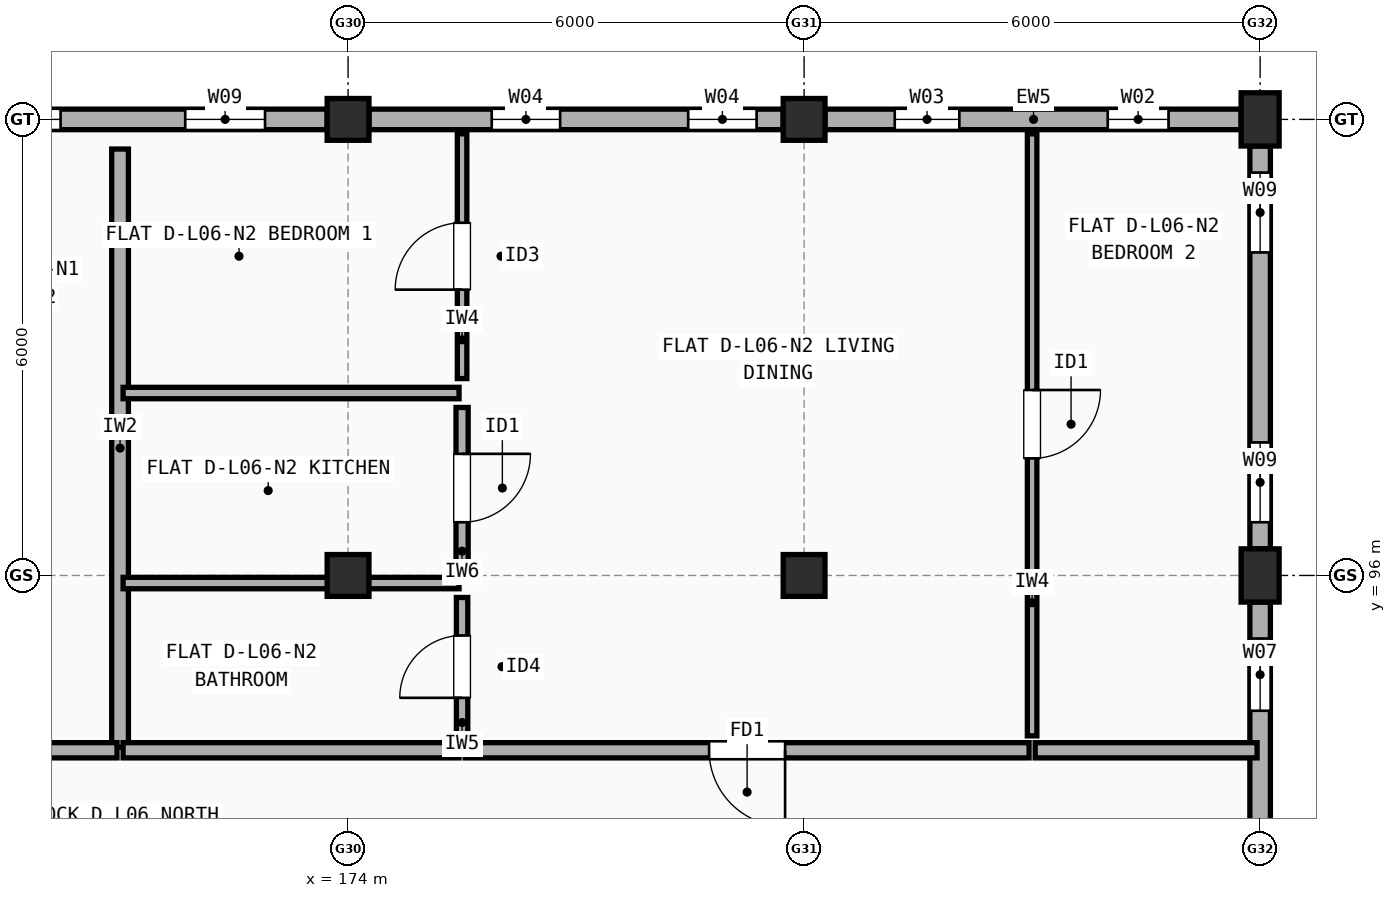
"""IFC4 building model, lengths in metres.
Left out: names, types, materials, properties, quantities, classifications, styles, units other than length and angle.
Written with IfcOpenShell. Run it as: python <this file> out.ifc"""

import sys

from ifc_helpers import new_model, si_unit, direction, frame, frame_2d, origin, origin_2d, place, context, subcontext, project, spatial, rectangle, extrude, element, fill, save


model = new_model("IFC4")
c1 = context("Model", 3, precision=1e-05, world=origin(), true_north=direction((0.0, 1.0)))
c2 = subcontext(c1, "Body", "Model", "MODEL_VIEW")
j1 = project(units=[si_unit("LENGTHUNIT", "METRE"), si_unit("PLANEANGLEUNIT", "RADIAN")], contexts=[c1])
p1 = place(None, origin())
s1 = spatial("IfcSite", under=j1, at=p1, CompositionType="ELEMENT")
p2 = place(p1, origin())
s2 = spatial("IfcBuilding", under=s1, at=p2, CompositionType="ELEMENT")
p3 = place(p2, frame((0.0, 0.0, 20.5)))
s3 = spatial("IfcBuildingStorey", under=s2, at=p3, CompositionType="ELEMENT", Elevation=20.5)
for number, where, z_axis, x_axis in (
    (1, (174.0, 96.0, 0.0), (0.0, 0.0, 1.0), (1.0, 0.0, 0.0)),
    (2, (174.0, 102.0, 0.0), (0.0, 0.0, 1.0), (1.0, 0.0, 0.0)),
    (3, (180.0, 96.0, 0.0), (0.0, 0.0, 1.0), (1.0, 0.0, 0.0)),
    (4, (180.0, 102.0, 0.0), (0.0, 0.0, 1.0), (1.0, 0.0, 0.0)),
):
    element("IfcColumn", number, at=place(p3, frame(where, z_axis=z_axis, x_axis=x_axis)), inside=s3, PredefinedType="COLUMN", context=c2, shape_type="SweptSolid", body=[
        extrude(rectangle(XDim=0.55, YDim=0.55, at=origin_2d()), origin(), (0.0, 0.0, 1.0), 2.97),
    ])
for number, where, z_axis, x_axis in (
    (5, (186.0, 96.0, 0.0), (0.0, 0.0, 1.0), (1.0, 0.0, 0.0)),
    (6, (186.0, 102.0, 0.0), (0.0, 0.0, 1.0), (1.0, 0.0, 0.0)),
):
    element("IfcColumn", number, at=place(p3, frame(where, z_axis=z_axis, x_axis=x_axis)), inside=s3, PredefinedType="COLUMN", context=c2, shape_type="SweptSolid", body=[
        extrude(rectangle(XDim=0.5, YDim=0.7, at=origin_2d()), origin(), (0.0, 0.0, 1.0), 2.97),
    ])
p4 = place(p3, frame((186.0, 90.35, 0.0), z_axis=(0.0, 0.0, 1.0), x_axis=(0.0, 1.0, 0.0)))
e7 = element("IfcWall", 7, at=p4, inside=s3, PredefinedType="STANDARD", context=c2, shape_type="SweptSolid", body=[
    extrude(rectangle(XDim=5.3, YDim=0.27, at=frame_2d((2.65, 0.0))), origin(), (0.0, 0.0, 1.0), 2.452),
])
p5 = place(p4, frame((1.205, 0.0, 0.9)))
e8 = element("IfcOpeningElement", 8, at=p5, cuts=e7, PredefinedType="OPENING", context=c2, shape_type="SweptSolid", body=[
    extrude(rectangle(XDim=0.9, YDim=1.3, at=frame_2d((0.45, 0.65))), frame((0.0, 0.145, 0.0), z_axis=(0.0, -1.0, 0.0), x_axis=(1.0, 0.0, 0.0)), (0.0, 0.0, 1.0), 0.29),
])
p6 = place(p4, frame((3.87, 0.0, 0.9)))
e9 = element("IfcOpeningElement", 9, at=p6, cuts=e7, PredefinedType="OPENING", context=c2, shape_type="SweptSolid", body=[
    extrude(rectangle(XDim=0.95, YDim=1.35, at=frame_2d((0.475, 0.675))), frame((0.0, 0.145, 0.0), z_axis=(0.0, -1.0, 0.0), x_axis=(1.0, 0.0, 0.0)), (0.0, 0.0, 1.0), 0.29),
])
p7 = place(p3, frame((186.0, 96.35, 0.0), z_axis=(0.0, 0.0, 1.0), x_axis=(0.0, 1.0, 0.0)))
e10 = element("IfcWall", 10, at=p7, inside=s3, PredefinedType="STANDARD", context=c2, shape_type="SweptSolid", body=[
    extrude(rectangle(XDim=5.3, YDim=0.27, at=frame_2d((2.65, 0.0))), origin(), (0.0, 0.0, 1.0), 2.452),
])
p8 = place(p7, frame((0.35, 0.0, 0.9)))
e11 = element("IfcOpeningElement", 11, at=p8, cuts=e10, PredefinedType="OPENING", context=c2, shape_type="SweptSolid", body=[
    extrude(rectangle(XDim=1.05, YDim=1.35, at=frame_2d((0.525, 0.675))), frame((0.0, 0.145, 0.0), z_axis=(0.0, -1.0, 0.0), x_axis=(1.0, 0.0, 0.0)), (0.0, 0.0, 1.0), 0.29),
])
p9 = place(p7, frame((3.9, 0.0, 0.9)))
e12 = element("IfcOpeningElement", 12, at=p9, cuts=e10, PredefinedType="OPENING", context=c2, shape_type="SweptSolid", body=[
    extrude(rectangle(XDim=1.05, YDim=1.35, at=frame_2d((0.525, 0.675))), frame((0.0, 0.145, 0.0), z_axis=(0.0, -1.0, 0.0), x_axis=(1.0, 0.0, 0.0)), (0.0, 0.0, 1.0), 0.29),
])
p10 = place(p3, frame((185.75, 102.0, 0.0), z_axis=(0.0, 0.0, 1.0), x_axis=(-1.0, 0.0, 0.0)))
e13 = element("IfcWall", 13, at=p10, inside=s3, PredefinedType="STANDARD", context=c2, shape_type="SweptSolid", body=[
    extrude(rectangle(XDim=5.475, YDim=0.27, at=frame_2d((2.738, 0.0))), origin(), (0.0, 0.0, 1.0), 2.452),
])
p11 = place(p10, frame((0.955, 0.0, 0.9)))
e14 = element("IfcOpeningElement", 14, at=p11, cuts=e13, PredefinedType="OPENING", context=c2, shape_type="SweptSolid", body=[
    extrude(rectangle(XDim=0.8, YDim=1.2, at=frame_2d((0.4, 0.6))), frame((0.0, 0.145, 0.0), z_axis=(0.0, -1.0, 0.0), x_axis=(1.0, 0.0, 0.0)), (0.0, 0.0, 1.0), 0.29),
])
p12 = place(p10, frame((3.708, 0.0, 0.9)))
e15 = element("IfcOpeningElement", 15, at=p12, cuts=e13, PredefinedType="OPENING", context=c2, shape_type="SweptSolid", body=[
    extrude(rectangle(XDim=0.85, YDim=1.25, at=frame_2d((0.425, 0.625))), frame((0.0, 0.145, 0.0), z_axis=(0.0, -1.0, 0.0), x_axis=(1.0, 0.0, 0.0)), (0.0, 0.0, 1.0), 0.29),
])
p13 = place(p3, frame((179.725, 102.0, 0.0), z_axis=(0.0, 0.0, 1.0), x_axis=(-1.0, 0.0, 0.0)))
e16 = element("IfcWall", 16, at=p13, inside=s3, PredefinedType="STANDARD", context=c2, shape_type="SweptSolid", body=[
    extrude(rectangle(XDim=5.45, YDim=0.27, at=frame_2d((2.725, 0.0))), origin(), (0.0, 0.0, 1.0), 2.452),
])
p14 = place(p13, frame((0.35, 0.0, 0.9)))
e17 = element("IfcOpeningElement", 17, at=p14, cuts=e16, PredefinedType="OPENING", context=c2, shape_type="SweptSolid", body=[
    extrude(rectangle(XDim=0.9, YDim=1.3, at=frame_2d((0.45, 0.65))), frame((0.0, 0.145, 0.0), z_axis=(0.0, -1.0, 0.0), x_axis=(1.0, 0.0, 0.0)), (0.0, 0.0, 1.0), 0.29),
])
p15 = place(p13, frame((2.935, 0.0, 0.9)))
e18 = element("IfcOpeningElement", 18, at=p15, cuts=e16, PredefinedType="OPENING", context=c2, shape_type="SweptSolid", body=[
    extrude(rectangle(XDim=0.9, YDim=1.3, at=frame_2d((0.45, 0.65))), frame((0.0, 0.145, 0.0), z_axis=(0.0, -1.0, 0.0), x_axis=(1.0, 0.0, 0.0)), (0.0, 0.0, 1.0), 0.29),
])
p16 = place(p3, frame((173.725, 102.0, 0.0), z_axis=(0.0, 0.0, 1.0), x_axis=(-1.0, 0.0, 0.0)))
e19 = element("IfcWall", 19, at=p16, inside=s3, PredefinedType="STANDARD", context=c2, shape_type="SweptSolid", body=[
    extrude(rectangle(XDim=5.45, YDim=0.27, at=frame_2d((2.725, 0.0))), origin(), (0.0, 0.0, 1.0), 2.452),
])
p17 = place(p16, frame((0.817, 0.0, 0.9)))
e20 = element("IfcOpeningElement", 20, at=p17, cuts=e19, PredefinedType="OPENING", context=c2, shape_type="SweptSolid", body=[
    extrude(rectangle(XDim=1.05, YDim=1.35, at=frame_2d((0.525, 0.675))), frame((0.0, 0.145, 0.0), z_axis=(0.0, -1.0, 0.0), x_axis=(1.0, 0.0, 0.0)), (0.0, 0.0, 1.0), 0.29),
])
p18 = place(p16, frame((3.508, 0.0, 0.9)))
e21 = element("IfcOpeningElement", 21, at=p18, cuts=e19, PredefinedType="OPENING", context=c2, shape_type="SweptSolid", body=[
    extrude(rectangle(XDim=1.2, YDim=1.35, at=frame_2d((0.6, 0.675))), frame((0.0, 0.145, 0.0), z_axis=(0.0, -1.0, 0.0), x_axis=(1.0, 0.0, 0.0)), (0.0, 0.0, 1.0), 0.29),
])
p19 = place(p3, frame((171.0, 93.74, 0.0), z_axis=(0.0, 0.0, 1.0), x_axis=(0.0, 1.0, 0.0)))
e22 = element("IfcWall", 22, at=p19, inside=s3, PredefinedType="SOLIDWALL", context=c2, shape_type="SweptSolid", body=[
    extrude(rectangle(XDim=7.87, YDim=0.22, at=frame_2d((3.935, 0.0))), origin(), (0.0, 0.0, 1.0), 2.508),
])
p20 = place(p3, frame((168.04, 93.7, 0.0), z_axis=(0.0, 0.0, 1.0), x_axis=(1.0, 0.0, 0.0)))
e23 = element("IfcWall", 23, at=p20, inside=s3, PredefinedType="SOLIDWALL", context=c2, shape_type="SweptSolid", body=[
    extrude(rectangle(XDim=2.92, YDim=0.2, at=frame_2d((1.46, 0.0))), origin(), (0.0, 0.0, 1.0), 2.508),
])
p21 = place(p3, frame((171.04, 93.7, 0.0), z_axis=(0.0, 0.0, 1.0), x_axis=(1.0, 0.0, 0.0)))
e24 = element("IfcWall", 24, at=p21, inside=s3, PredefinedType="SOLIDWALL", context=c2, shape_type="SweptSolid", body=[
    extrude(rectangle(XDim=4.42, YDim=0.2, at=frame_2d((2.21, 0.0))), origin(), (0.0, 0.0, 1.0), 2.97),
])
p22 = place(p3, frame((175.54, 93.7, 0.0), z_axis=(0.0, 0.0, 1.0), x_axis=(1.0, 0.0, 0.0)))
e25 = element("IfcWall", 25, at=p22, inside=s3, PredefinedType="SOLIDWALL", context=c2, shape_type="SweptSolid", body=[
    extrude(rectangle(XDim=7.42, YDim=0.2, at=frame_2d((3.71, 0.0))), origin(), (0.0, 0.0, 1.0), 2.97),
])
p23 = place(p22, frame((3.21, 0.0, 0.0)))
e26 = element("IfcOpeningElement", 26, at=p23, cuts=e25, PredefinedType="OPENING", context=c2, shape_type="SweptSolid", body=[
    extrude(rectangle(XDim=1.0, YDim=2.15, at=frame_2d((0.5, 1.075))), frame((0.0, 0.11, 0.0), z_axis=(0.0, -1.0, 0.0), x_axis=(1.0, 0.0, 0.0)), (0.0, 0.0, 1.0), 0.22),
])
p24 = place(p3, frame((175.5, 98.59, 0.0), z_axis=(0.0, 0.0, 1.0), x_axis=(0.0, 1.0, 0.0)))
e27 = element("IfcWall", 27, at=p24, inside=s3, PredefinedType="PARTITIONING", context=c2, shape_type="SweptSolid", body=[
    extrude(rectangle(XDim=3.22, YDim=0.125, at=frame_2d((1.61, 0.0))), origin(), (0.0, 0.0, 1.0), 2.97),
])
p25 = place(p24, frame((1.17, 0.0, 0.0)))
e28 = element("IfcOpeningElement", 28, at=p25, cuts=e27, PredefinedType="OPENING", context=c2, shape_type="SweptSolid", body=[
    extrude(rectangle(XDim=0.88, YDim=2.1, at=frame_2d((0.44, 1.05))), frame((0.0, 0.073, 0.0), z_axis=(0.0, -1.0, 0.0), x_axis=(1.0, 0.0, 0.0)), (0.0, 0.0, 1.0), 0.145),
])
p26 = place(p3, frame((175.5, 96.09, 0.0), z_axis=(0.0, 0.0, 1.0), x_axis=(0.0, 1.0, 0.0)))
e29 = element("IfcWall", 29, at=p26, inside=s3, PredefinedType="PLUMBINGWALL", context=c2, shape_type="SweptSolid", body=[
    extrude(rectangle(XDim=2.12, YDim=0.16, at=frame_2d((1.06, 0.0))), origin(), (0.0, 0.0, 1.0), 2.408),
])
p27 = place(p26, frame((0.61, 0.0, 0.0)))
e30 = element("IfcOpeningElement", 30, at=p27, cuts=e29, PredefinedType="OPENING", context=c2, shape_type="SweptSolid", body=[
    extrude(rectangle(XDim=0.9, YDim=2.1, at=frame_2d((0.45, 1.05))), frame((0.0, 0.09, 0.0), z_axis=(0.0, -1.0, 0.0), x_axis=(1.0, 0.0, 0.0)), (0.0, 0.0, 1.0), 0.18),
])
p28 = place(p3, frame((175.5, 93.89, 0.0), z_axis=(0.0, 0.0, 1.0), x_axis=(0.0, 1.0, 0.0)))
e31 = element("IfcWall", 31, at=p28, inside=s3, PredefinedType="PARTITIONING", context=c2, shape_type="SweptSolid", body=[
    extrude(rectangle(XDim=1.82, YDim=0.15, at=frame_2d((0.91, 0.0))), origin(), (0.0, 0.0, 1.0), 2.97),
])
p29 = place(p28, frame((0.5, 0.0, 0.0)))
e32 = element("IfcOpeningElement", 32, at=p29, cuts=e31, PredefinedType="OPENING", context=c2, shape_type="SweptSolid", body=[
    extrude(rectangle(XDim=0.82, YDim=2.08, at=frame_2d((0.41, 1.04))), frame((0.0, 0.085, 0.0), z_axis=(0.0, -1.0, 0.0), x_axis=(1.0, 0.0, 0.0)), (0.0, 0.0, 1.0), 0.17),
])
p30 = place(p3, frame((171.04, 98.4, 0.0), z_axis=(0.0, 0.0, 1.0), x_axis=(1.0, 0.0, 0.0)))
e33 = element("IfcWall", 33, at=p30, inside=s3, PredefinedType="PARTITIONING", context=c2, shape_type="SweptSolid", body=[
    extrude(rectangle(XDim=4.42, YDim=0.15, at=frame_2d((2.21, 0.0))), origin(), (0.0, 0.0, 1.0), 2.508),
])
p31 = place(p3, frame((171.04, 95.9, 0.0), z_axis=(0.0, 0.0, 1.0), x_axis=(1.0, 0.0, 0.0)))
e34 = element("IfcWall", 34, at=p31, inside=s3, PredefinedType="PARTITIONING", context=c2, shape_type="SweptSolid", body=[
    extrude(rectangle(XDim=4.42, YDim=0.15, at=frame_2d((2.21, 0.0))), origin(), (0.0, 0.0, 1.0), 2.408),
])
p32 = place(p3, frame((183.04, 93.7, 0.0), z_axis=(0.0, 0.0, 1.0), x_axis=(1.0, 0.0, 0.0)))
e35 = element("IfcWall", 35, at=p32, inside=s3, PredefinedType="SOLIDWALL", context=c2, shape_type="SweptSolid", body=[
    extrude(rectangle(XDim=2.92, YDim=0.2, at=frame_2d((1.46, 0.0))), origin(), (0.0, 0.0, 1.0), 2.452),
])
p33 = place(p3, frame((183.0, 93.89, 0.0), z_axis=(0.0, 0.0, 1.0), x_axis=(0.0, 1.0, 0.0)))
e36 = element("IfcWall", 36, at=p33, inside=s3, PredefinedType="PARTITIONING", context=c2, shape_type="SweptSolid", body=[
    extrude(rectangle(XDim=7.92, YDim=0.125, at=frame_2d((3.96, 0.0))), origin(), (0.0, 0.0, 1.0), 2.548),
])
p34 = place(p33, frame((3.65, 0.0, 0.0)))
e37 = element("IfcOpeningElement", 37, at=p34, cuts=e36, PredefinedType="OPENING", context=c2, shape_type="SweptSolid", body=[
    extrude(rectangle(XDim=0.9, YDim=2.1, at=frame_2d((0.45, 1.05))), frame((0.0, 0.073, 0.0), z_axis=(0.0, -1.0, 0.0), x_axis=(1.0, 0.0, 0.0)), (0.0, 0.0, 1.0), 0.145),
])
p35 = place(p6, origin())
e38 = element("IfcWindow", 38, at=p35, inside=s3, PartitioningType="SINGLE_PANEL", PredefinedType="WINDOW", context=c2, shape_type="SweptSolid", body=[
    extrude(rectangle(XDim=0.95, YDim=1.35, at=frame_2d((0.475, 0.675))), frame((0.0, 0.03, 0.0), z_axis=(0.0, -1.0, 0.0), x_axis=(1.0, 0.0, 0.0)), (0.0, 0.0, 1.0), 0.06),
])
fill(e9, e38)
p36 = place(p8, origin())
e39 = element("IfcWindow", 39, at=p36, inside=s3, PartitioningType="SINGLE_PANEL", PredefinedType="WINDOW", context=c2, shape_type="SweptSolid", body=[
    extrude(rectangle(XDim=1.05, YDim=1.35, at=frame_2d((0.525, 0.675))), frame((0.0, 0.03, 0.0), z_axis=(0.0, -1.0, 0.0), x_axis=(1.0, 0.0, 0.0)), (0.0, 0.0, 1.0), 0.06),
])
fill(e11, e39)
p37 = place(p9, origin())
e40 = element("IfcWindow", 40, at=p37, inside=s3, PartitioningType="SINGLE_PANEL", PredefinedType="WINDOW", context=c2, shape_type="SweptSolid", body=[
    extrude(rectangle(XDim=1.05, YDim=1.35, at=frame_2d((0.525, 0.675))), frame((0.0, 0.03, 0.0), z_axis=(0.0, -1.0, 0.0), x_axis=(1.0, 0.0, 0.0)), (0.0, 0.0, 1.0), 0.06),
])
fill(e12, e40)
p38 = place(p11, origin())
e41 = element("IfcWindow", 41, at=p38, inside=s3, PartitioningType="SINGLE_PANEL", PredefinedType="WINDOW", context=c2, shape_type="SweptSolid", body=[
    extrude(rectangle(XDim=0.8, YDim=1.2, at=frame_2d((0.4, 0.6))), frame((0.0, 0.03, 0.0), z_axis=(0.0, -1.0, 0.0), x_axis=(1.0, 0.0, 0.0)), (0.0, 0.0, 1.0), 0.06),
])
fill(e14, e41)
p39 = place(p12, origin())
e42 = element("IfcWindow", 42, at=p39, inside=s3, PartitioningType="SINGLE_PANEL", PredefinedType="WINDOW", context=c2, shape_type="SweptSolid", body=[
    extrude(rectangle(XDim=0.85, YDim=1.25, at=frame_2d((0.425, 0.625))), frame((0.0, 0.03, 0.0), z_axis=(0.0, -1.0, 0.0), x_axis=(1.0, 0.0, 0.0)), (0.0, 0.0, 1.0), 0.06),
])
fill(e15, e42)
p40 = place(p14, origin())
e43 = element("IfcWindow", 43, at=p40, inside=s3, PartitioningType="SINGLE_PANEL", PredefinedType="WINDOW", context=c2, shape_type="SweptSolid", body=[
    extrude(rectangle(XDim=0.9, YDim=1.3, at=frame_2d((0.45, 0.65))), frame((0.0, 0.03, 0.0), z_axis=(0.0, -1.0, 0.0), x_axis=(1.0, 0.0, 0.0)), (0.0, 0.0, 1.0), 0.06),
])
fill(e17, e43)
p41 = place(p15, origin())
e44 = element("IfcWindow", 44, at=p41, inside=s3, PartitioningType="SINGLE_PANEL", PredefinedType="WINDOW", context=c2, shape_type="SweptSolid", body=[
    extrude(rectangle(XDim=0.9, YDim=1.3, at=frame_2d((0.45, 0.65))), frame((0.0, 0.03, 0.0), z_axis=(0.0, -1.0, 0.0), x_axis=(1.0, 0.0, 0.0)), (0.0, 0.0, 1.0), 0.06),
])
fill(e18, e44)
p42 = place(p17, origin())
e45 = element("IfcWindow", 45, at=p42, inside=s3, PartitioningType="SINGLE_PANEL", PredefinedType="WINDOW", context=c2, shape_type="SweptSolid", body=[
    extrude(rectangle(XDim=1.05, YDim=1.35, at=frame_2d((0.525, 0.675))), frame((0.0, 0.03, 0.0), z_axis=(0.0, -1.0, 0.0), x_axis=(1.0, 0.0, 0.0)), (0.0, 0.0, 1.0), 0.06),
])
fill(e20, e45)
p43 = place(p18, origin())
e46 = element("IfcWindow", 46, at=p43, inside=s3, PartitioningType="SINGLE_PANEL", PredefinedType="WINDOW", context=c2, shape_type="SweptSolid", body=[
    extrude(rectangle(XDim=1.2, YDim=1.35, at=frame_2d((0.6, 0.675))), frame((0.0, 0.03, 0.0), z_axis=(0.0, -1.0, 0.0), x_axis=(1.0, 0.0, 0.0)), (0.0, 0.0, 1.0), 0.06),
])
fill(e21, e46)
p44 = place(p23, origin())
e47 = element("IfcDoor", 47, at=p44, inside=s3, OperationType="SINGLE_SWING_RIGHT", PredefinedType="DOOR", context=c2, shape_type="SweptSolid", body=[
    extrude(rectangle(XDim=1.0, YDim=2.15, at=frame_2d((0.5, 1.075))), frame((0.0, 0.025, 0.0), z_axis=(0.0, -1.0, 0.0), x_axis=(1.0, 0.0, 0.0)), (0.0, 0.0, 1.0), 0.05),
])
fill(e26, e47)
p45 = place(p25, origin())
e48 = element("IfcDoor", 48, at=p45, inside=s3, OperationType="SINGLE_SWING_LEFT", PredefinedType="DOOR", context=c2, shape_type="SweptSolid", body=[
    extrude(rectangle(XDim=0.88, YDim=2.1, at=frame_2d((0.44, 1.05))), frame((0.0, 0.025, 0.0), z_axis=(0.0, -1.0, 0.0), x_axis=(1.0, 0.0, 0.0)), (0.0, 0.0, 1.0), 0.05),
])
fill(e28, e48)
p46 = place(p27, origin())
e49 = element("IfcDoor", 49, at=p46, inside=s3, OperationType="SINGLE_SWING_RIGHT", PredefinedType="DOOR", context=c2, shape_type="SweptSolid", body=[
    extrude(rectangle(XDim=0.9, YDim=2.1, at=frame_2d((0.45, 1.05))), frame((0.0, 0.025, 0.0), z_axis=(0.0, -1.0, 0.0), x_axis=(1.0, 0.0, 0.0)), (0.0, 0.0, 1.0), 0.05),
])
fill(e30, e49)
p47 = place(p29, origin())
e50 = element("IfcDoor", 50, at=p47, inside=s3, OperationType="SINGLE_SWING_LEFT", PredefinedType="DOOR", context=c2, shape_type="SweptSolid", body=[
    extrude(rectangle(XDim=0.82, YDim=2.08, at=frame_2d((0.41, 1.04))), frame((0.0, 0.025, 0.0), z_axis=(0.0, -1.0, 0.0), x_axis=(1.0, 0.0, 0.0)), (0.0, 0.0, 1.0), 0.05),
])
fill(e32, e50)
p48 = place(p34, origin())
e51 = element("IfcDoor", 51, at=p48, inside=s3, OperationType="SINGLE_SWING_RIGHT", PredefinedType="DOOR", context=c2, shape_type="SweptSolid", body=[
    extrude(rectangle(XDim=0.9, YDim=2.1, at=frame_2d((0.45, 1.05))), frame((0.0, 0.025, 0.0), z_axis=(0.0, -1.0, 0.0), x_axis=(1.0, 0.0, 0.0)), (0.0, 0.0, 1.0), 0.05),
])
fill(e37, e51)
save(model, sys.argv[1])
